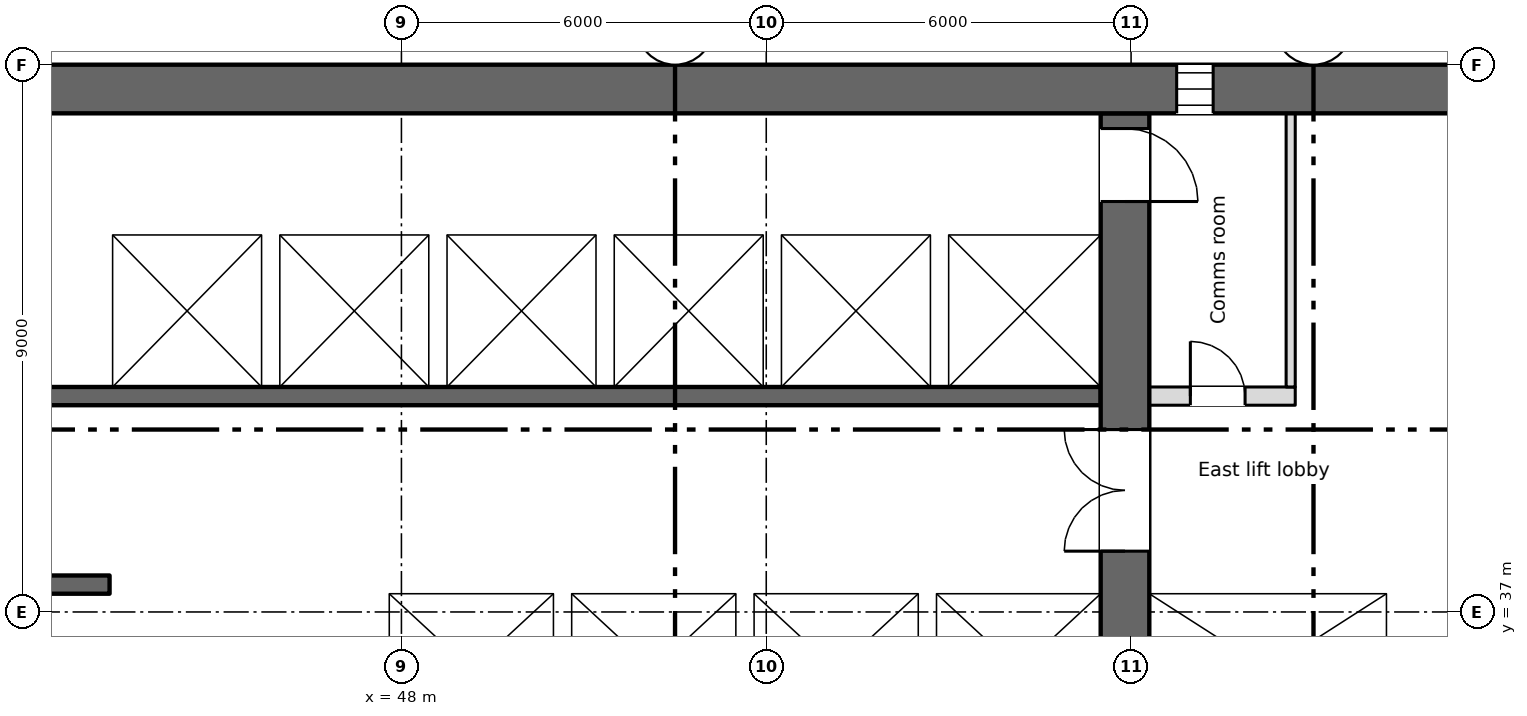
"""IFC4 building model, lengths in metres.
Left out: names, types, materials, properties, quantities, classifications, styles, units other than length and angle.
Written with IfcOpenShell. Run it as: python <this file> out.ifc"""

import sys

from ifc_helpers import new_model, si_unit, direction, frame, frame_2d, origin, place, context, subcontext, project, spatial, rectangle, extrude, element, fill, save


model = new_model("IFC4")
c1 = context("Model", 3, precision=1e-05, world=origin(), true_north=direction((0.0, 1.0)))
c2 = subcontext(c1, "Body", "Model", "MODEL_VIEW")
j1 = project(units=[si_unit("LENGTHUNIT", "METRE"), si_unit("PLANEANGLEUNIT", "RADIAN")], contexts=[c1])
p1 = place(None, origin())
s1 = spatial("IfcSite", under=j1, at=p1, CompositionType="ELEMENT")
p2 = place(p1, origin())
s2 = spatial("IfcBuilding", under=s1, at=p2, CompositionType="ELEMENT")
p3 = place(p2, frame((0.0, 0.0, 132.5)))
s3 = spatial("IfcBuildingStorey", under=s2, at=p3, CompositionType="ELEMENT", Elevation=132.5)
p4 = place(p3, frame((5.55, 45.6, 0.0), z_axis=(0.0, 0.0, 1.0), x_axis=(1.0, 0.0, 0.0)))
e1 = element("IfcWall", 1, at=p4, inside=s3, PredefinedType="SHEAR", context=c2, shape_type="SweptSolid", body=[
    extrude(rectangle(XDim=60.9, YDim=0.8, at=frame_2d((30.45, 0.0))), origin(), (0.0, 0.0, 1.0), 3.35),
])
p5 = place(p4, frame((1.2, 0.0, 0.6)))
e2 = element("IfcOpeningElement", 2, at=p5, cuts=e1, PredefinedType="OPENING", context=c2, shape_type="SweptSolid", body=[
    extrude(rectangle(XDim=0.6, YDim=2.4, at=frame_2d((0.3, 1.2))), frame((0.0, 0.41, 0.0), z_axis=(0.0, -1.0, 0.0), x_axis=(1.0, 0.0, 0.0)), (0.0, 0.0, 1.0), 0.82),
])
p6 = place(p4, frame((7.2, 0.0, 0.6)))
e3 = element("IfcOpeningElement", 3, at=p6, cuts=e1, PredefinedType="OPENING", context=c2, shape_type="SweptSolid", body=[
    extrude(rectangle(XDim=0.6, YDim=2.4, at=frame_2d((0.3, 1.2))), frame((0.0, 0.41, 0.0), z_axis=(0.0, -1.0, 0.0), x_axis=(1.0, 0.0, 0.0)), (0.0, 0.0, 1.0), 0.82),
])
p7 = place(p4, frame((55.2, 0.0, 0.6)))
e4 = element("IfcOpeningElement", 4, at=p7, cuts=e1, PredefinedType="OPENING", context=c2, shape_type="SweptSolid", body=[
    extrude(rectangle(XDim=0.6, YDim=2.4, at=frame_2d((0.3, 1.2))), frame((0.0, 0.41, 0.0), z_axis=(0.0, -1.0, 0.0), x_axis=(1.0, 0.0, 0.0)), (0.0, 0.0, 1.0), 0.82),
])
p8 = place(p3, frame((64.35, 34.8, 0.0), z_axis=(0.0, 0.0, 1.0), x_axis=(0.0, 1.0, 0.0)))
e5 = element("IfcWall", 5, at=p8, inside=s3, PredefinedType="SHEAR", context=c2, shape_type="SweptSolid", body=[
    extrude(rectangle(XDim=10.4, YDim=0.3, at=frame_2d((5.2, 0.0))), origin(), (0.0, 0.0, 1.0), 3.35),
])
p9 = place(p3, frame((59.9, 28.4, 0.0), z_axis=(0.0, 0.0, 1.0), x_axis=(0.0, 1.0, 0.0)))
e6 = element("IfcWall", 6, at=p9, inside=s3, PredefinedType="SHEAR", context=c2, shape_type="SweptSolid", body=[
    extrude(rectangle(XDim=16.8, YDim=0.8, at=frame_2d((8.4, 0.0))), origin(), (0.0, 0.0, 1.0), 3.35),
])
p10 = place(p9, frame((9.6, 0.0, 0.0)))
e7 = element("IfcOpeningElement", 7, at=p10, cuts=e6, PredefinedType="OPENING", context=c2, shape_type="SweptSolid", body=[
    extrude(rectangle(XDim=2.0, YDim=2.1, at=frame_2d((1.0, 1.05))), frame((0.0, 0.41, 0.0), z_axis=(0.0, -1.0, 0.0), x_axis=(1.0, 0.0, 0.0)), (0.0, 0.0, 1.0), 0.82),
])
p11 = place(p9, frame((15.35, 0.0, 0.0)))
e8 = element("IfcOpeningElement", 8, at=p11, cuts=e6, PredefinedType="OPENING", context=c2, shape_type="SweptSolid", body=[
    extrude(rectangle(XDim=1.2, YDim=2.1, at=frame_2d((0.6, 1.05))), frame((0.0, 0.41, 0.0), z_axis=(0.0, -1.0, 0.0), x_axis=(1.0, 0.0, 0.0)), (0.0, 0.0, 1.0), 0.82),
])
p12 = place(p3, frame((43.2, 37.45, 0.0), z_axis=(0.0, 0.0, 1.0), x_axis=(-1.0, 0.0, 0.0)))
e9 = element("IfcWall", 9, at=p12, inside=s3, PredefinedType="SHEAR", context=c2, shape_type="SweptSolid", body=[
    extrude(rectangle(XDim=8.4, YDim=0.3, at=frame_2d((4.2, 0.0))), origin(), (0.0, 0.0, 1.0), 3.35),
])
p13 = place(p12, frame((3.75, 0.0, 0.0)))
e10 = element("IfcOpeningElement", 10, at=p13, cuts=e9, PredefinedType="OPENING", context=c2, shape_type="SweptSolid", body=[
    extrude(rectangle(XDim=0.9, YDim=2.1, at=frame_2d((0.45, 1.05))), frame((0.0, 0.16, 0.0), z_axis=(0.0, -1.0, 0.0), x_axis=(1.0, 0.0, 0.0)), (0.0, 0.0, 1.0), 0.32),
])
p14 = place(p3, frame((47.3, 37.45, 0.0), z_axis=(0.0, 0.0, 1.0), x_axis=(1.0, 0.0, 0.0)))
e11 = element("IfcWall", 11, at=p14, inside=s3, PredefinedType="SHEAR", context=c2, shape_type="SweptSolid", body=[
    extrude(rectangle(XDim=12.2, YDim=0.3, at=frame_2d((6.1, 0.0))), origin(), (0.0, 0.0, 1.0), 3.35),
])
p15 = place(p14, frame((4.3, 0.0, 0.0)))
e12 = element("IfcOpeningElement", 12, at=p15, cuts=e11, PredefinedType="OPENING", context=c2, shape_type="SweptSolid", body=[
    extrude(rectangle(XDim=1.1, YDim=2.1, at=frame_2d((0.55, 1.05))), frame((0.0, 0.16, 0.0), z_axis=(0.0, -1.0, 0.0), x_axis=(1.0, 0.0, 0.0)), (0.0, 0.0, 1.0), 0.32),
])
p16 = place(p14, frame((7.3, 0.0, 0.0)))
e13 = element("IfcOpeningElement", 13, at=p16, cuts=e11, PredefinedType="OPENING", context=c2, shape_type="SweptSolid", body=[
    extrude(rectangle(XDim=1.1, YDim=2.1, at=frame_2d((0.55, 1.05))), frame((0.0, 0.16, 0.0), z_axis=(0.0, -1.0, 0.0), x_axis=(1.0, 0.0, 0.0)), (0.0, 0.0, 1.0), 0.32),
])
p17 = place(p14, frame((10.3, 0.0, 0.0)))
e14 = element("IfcOpeningElement", 14, at=p17, cuts=e11, PredefinedType="OPENING", context=c2, shape_type="SweptSolid", body=[
    extrude(rectangle(XDim=1.1, YDim=2.1, at=frame_2d((0.55, 1.05))), frame((0.0, 0.16, 0.0), z_axis=(0.0, -1.0, 0.0), x_axis=(1.0, 0.0, 0.0)), (0.0, 0.0, 1.0), 0.32),
])
p18 = place(p3, frame((60.3, 37.45, 0.0), z_axis=(0.0, 0.0, 1.0), x_axis=(1.0, 0.0, 0.0)))
e15 = element("IfcWall", 15, at=p18, inside=s3, PredefinedType="SHEAR", context=c2, shape_type="SweptSolid", body=[
    extrude(rectangle(XDim=3.9, YDim=0.3, at=frame_2d((1.95, 0.0))), origin(), (0.0, 0.0, 1.0), 3.35),
])
p19 = place(p18, frame((1.4, 0.0, 0.0)))
e16 = element("IfcOpeningElement", 16, at=p19, cuts=e15, PredefinedType="OPENING", context=c2, shape_type="SweptSolid", body=[
    extrude(rectangle(XDim=1.1, YDim=2.1, at=frame_2d((0.55, 1.05))), frame((0.0, 0.16, 0.0), z_axis=(0.0, -1.0, 0.0), x_axis=(1.0, 0.0, 0.0)), (0.0, 0.0, 1.0), 0.32),
])
p20 = place(p3, frame((43.05, 34.8, 0.0), z_axis=(0.0, 0.0, 1.0), x_axis=(0.0, 1.0, 0.0)))
e17 = element("IfcWall", 17, at=p20, inside=s3, PredefinedType="SHEAR", context=c2, shape_type="SweptSolid", body=[
    extrude(rectangle(XDim=2.5, YDim=0.3, at=frame_2d((1.25, 0.0))), origin(), (0.0, 0.0, 1.0), 3.35),
])
p21 = place(p3, frame((47.55, 34.8, 0.0), z_axis=(0.0, 0.0, 1.0), x_axis=(0.0, 1.0, 0.0)))
e18 = element("IfcWall", 18, at=p21, inside=s3, PredefinedType="SHEAR", context=c2, shape_type="SweptSolid", body=[
    extrude(rectangle(XDim=2.5, YDim=0.5, at=frame_2d((1.25, 0.0))), origin(), (0.0, 0.0, 1.0), 3.35),
])
p22 = place(p3, frame((50.65, 34.8, 0.0), z_axis=(0.0, 0.0, 1.0), x_axis=(0.0, 1.0, 0.0)))
e19 = element("IfcWall", 19, at=p22, inside=s3, PredefinedType="SHEAR", context=c2, shape_type="SweptSolid", body=[
    extrude(rectangle(XDim=2.5, YDim=0.3, at=frame_2d((1.25, 0.0))), origin(), (0.0, 0.0, 1.0), 3.35),
])
p23 = place(p3, frame((18.5, 40.55, 0.0), z_axis=(0.0, 0.0, 1.0), x_axis=(1.0, 0.0, 0.0)))
e20 = element("IfcWall", 20, at=p23, inside=s3, PredefinedType="SHEAR", context=c2, shape_type="SweptSolid", body=[
    extrude(rectangle(XDim=41.0, YDim=0.3, at=frame_2d((20.5, 0.0))), origin(), (0.0, 0.0, 1.0), 3.35),
])
p24 = place(p23, frame((15.9, 0.0, 0.0)))
e21 = element("IfcOpeningElement", 21, at=p24, cuts=e20, PredefinedType="OPENING", context=c2, shape_type="SweptSolid", body=[
    extrude(rectangle(XDim=0.9, YDim=2.1, at=frame_2d((0.45, 1.05))), frame((0.0, 0.16, 0.0), z_axis=(0.0, -1.0, 0.0), x_axis=(1.0, 0.0, 0.0)), (0.0, 0.0, 1.0), 0.32),
])
p25 = place(p23, frame((21.4, 0.0, 0.0)))
e22 = element("IfcOpeningElement", 22, at=p25, cuts=e20, PredefinedType="OPENING", context=c2, shape_type="SweptSolid", body=[
    extrude(rectangle(XDim=0.9, YDim=2.1, at=frame_2d((0.45, 1.05))), frame((0.0, 0.16, 0.0), z_axis=(0.0, -1.0, 0.0), x_axis=(1.0, 0.0, 0.0)), (0.0, 0.0, 1.0), 0.32),
])
p26 = place(p23, frame((6.175, 0.0, 0.0)))
e23 = element("IfcOpeningElement", 23, at=p26, cuts=e20, PredefinedType="OPENING", context=c2, shape_type="SweptSolid", body=[
    extrude(rectangle(XDim=1.1, YDim=2.1, at=frame_2d((0.55, 1.05))), frame((0.0, 0.16, 0.0), z_axis=(0.0, -1.0, 0.0), x_axis=(1.0, 0.0, 0.0)), (0.0, 0.0, 1.0), 0.32),
])
p27 = place(p23, frame((8.925, 0.0, 0.0)))
e24 = element("IfcOpeningElement", 24, at=p27, cuts=e20, PredefinedType="OPENING", context=c2, shape_type="SweptSolid", body=[
    extrude(rectangle(XDim=1.1, YDim=2.1, at=frame_2d((0.55, 1.05))), frame((0.0, 0.16, 0.0), z_axis=(0.0, -1.0, 0.0), x_axis=(1.0, 0.0, 0.0)), (0.0, 0.0, 1.0), 0.32),
])
p28 = place(p23, frame((11.675, 0.0, 0.0)))
e25 = element("IfcOpeningElement", 25, at=p28, cuts=e20, PredefinedType="OPENING", context=c2, shape_type="SweptSolid", body=[
    extrude(rectangle(XDim=1.1, YDim=2.1, at=frame_2d((0.55, 1.05))), frame((0.0, 0.16, 0.0), z_axis=(0.0, -1.0, 0.0), x_axis=(1.0, 0.0, 0.0)), (0.0, 0.0, 1.0), 0.32),
])
p29 = place(p23, frame((30.925, 0.0, 0.0)))
e26 = element("IfcOpeningElement", 26, at=p29, cuts=e20, PredefinedType="OPENING", context=c2, shape_type="SweptSolid", body=[
    extrude(rectangle(XDim=1.1, YDim=2.1, at=frame_2d((0.55, 1.05))), frame((0.0, 0.16, 0.0), z_axis=(0.0, -1.0, 0.0), x_axis=(1.0, 0.0, 0.0)), (0.0, 0.0, 1.0), 0.32),
])
p30 = place(p23, frame((33.675, 0.0, 0.0)))
e27 = element("IfcOpeningElement", 27, at=p30, cuts=e20, PredefinedType="OPENING", context=c2, shape_type="SweptSolid", body=[
    extrude(rectangle(XDim=1.1, YDim=2.1, at=frame_2d((0.55, 1.05))), frame((0.0, 0.16, 0.0), z_axis=(0.0, -1.0, 0.0), x_axis=(1.0, 0.0, 0.0)), (0.0, 0.0, 1.0), 0.32),
])
p31 = place(p23, frame((36.375, 0.0, 0.0)))
e28 = element("IfcOpeningElement", 28, at=p31, cuts=e20, PredefinedType="OPENING", context=c2, shape_type="SweptSolid", body=[
    extrude(rectangle(XDim=1.2, YDim=2.1, at=frame_2d((0.6, 1.05))), frame((0.0, 0.16, 0.0), z_axis=(0.0, -1.0, 0.0), x_axis=(1.0, 0.0, 0.0)), (0.0, 0.0, 1.0), 0.32),
])
p32 = place(p23, frame((39.15, 0.0, 0.0)))
e29 = element("IfcOpeningElement", 29, at=p32, cuts=e20, PredefinedType="OPENING", context=c2, shape_type="SweptSolid", body=[
    extrude(rectangle(XDim=1.2, YDim=2.1, at=frame_2d((0.6, 1.05))), frame((0.0, 0.16, 0.0), z_axis=(0.0, -1.0, 0.0), x_axis=(1.0, 0.0, 0.0)), (0.0, 0.0, 1.0), 0.32),
])
p33 = place(p3, frame((18.5, 43.35, 0.0), z_axis=(0.0, 0.0, 1.0), x_axis=(1.0, 0.0, 0.0)))
e30 = element("IfcWall", 30, at=p33, inside=s3, PredefinedType="SHEAR", context=c2, shape_type="SweptSolid", body=[
    extrude(rectangle(XDim=41.0, YDim=0.3, at=frame_2d((20.5, 0.0))), origin(), (0.0, 0.0, 1.0), 3.35),
])
p34 = place(p3, frame((60.3, 40.55, 0.0), z_axis=(0.0, 0.0, 1.0), x_axis=(1.0, 0.0, 0.0)))
e31 = element("IfcWall", 31, at=p34, inside=s3, PredefinedType="PARTITIONING", context=c2, shape_type="SweptSolid", body=[
    extrude(rectangle(XDim=2.4, YDim=0.3, at=frame_2d((1.2, 0.0))), origin(), (0.0, 0.0, 1.0), 3.35),
])
p35 = place(p34, frame((0.675, 0.0, 0.0)))
e32 = element("IfcOpeningElement", 32, at=p35, cuts=e31, PredefinedType="OPENING", context=c2, shape_type="SweptSolid", body=[
    extrude(rectangle(XDim=0.9, YDim=2.1, at=frame_2d((0.45, 1.05))), frame((0.0, 0.16, 0.0), z_axis=(0.0, -1.0, 0.0), x_axis=(1.0, 0.0, 0.0)), (0.0, 0.0, 1.0), 0.32),
])
for number, where, z_axis, x_axis in (
    (33, (53.65, 34.8, 0.0), (0.0, 0.0, 1.0), (0.0, 1.0, 0.0)),
    (34, (56.65, 34.8, 0.0), (0.0, 0.0, 1.0), (0.0, 1.0, 0.0)),
    (35, (43.1, 40.7, 0.0), (0.0, 0.0, 1.0), (0.0, 1.0, 0.0)),
    (36, (45.85, 40.7, 0.0), (0.0, 0.0, 1.0), (0.0, 1.0, 0.0)),
    (37, (48.6, 40.7, 0.0), (0.0, 0.0, 1.0), (0.0, 1.0, 0.0)),
    (38, (51.35, 40.7, 0.0), (0.0, 0.0, 1.0), (0.0, 1.0, 0.0)),
    (39, (54.1, 40.7, 0.0), (0.0, 0.0, 1.0), (0.0, 1.0, 0.0)),
    (40, (56.85, 40.7, 0.0), (0.0, 0.0, 1.0), (0.0, 1.0, 0.0)),
):
    element("IfcWall", number, at=place(p3, frame(where, z_axis=z_axis, x_axis=x_axis)), inside=s3, PredefinedType="SHEAR", context=c2, shape_type="SweptSolid", body=[
        extrude(rectangle(XDim=2.5, YDim=0.3, at=frame_2d((1.25, 0.0))), origin(), (0.0, 0.0, 1.0), 3.35),
    ])
p36 = place(p3, frame((62.625, 40.7, 0.0), z_axis=(0.0, 0.0, 1.0), x_axis=(0.0, 1.0, 0.0)))
e41 = element("IfcWall", 41, at=p36, inside=s3, PredefinedType="PARTITIONING", context=c2, shape_type="SweptSolid", body=[
    extrude(rectangle(XDim=4.5, YDim=0.15, at=frame_2d((2.25, 0.0))), origin(), (0.0, 0.0, 1.0), 3.35),
])
p37 = place(p7, origin())
e42 = element("IfcWindow", 42, at=p37, inside=s3, PartitioningType="SINGLE_PANEL", PredefinedType="WINDOW", context=c2, shape_type="SweptSolid", body=[
    extrude(rectangle(XDim=0.6, YDim=2.4, at=frame_2d((0.3, 1.2))), frame((0.0, 0.03, 0.0), z_axis=(0.0, -1.0, 0.0), x_axis=(1.0, 0.0, 0.0)), (0.0, 0.0, 1.0), 0.06),
])
fill(e4, e42)
p38 = place(p35, origin())
e43 = element("IfcDoor", 43, at=p38, inside=s3, OperationType="SINGLE_SWING_LEFT", PredefinedType="DOOR", context=c2, shape_type="SweptSolid", body=[
    extrude(rectangle(XDim=0.9, YDim=2.1, at=frame_2d((0.45, 1.05))), frame((0.0, 0.025, 0.0), z_axis=(0.0, -1.0, 0.0), x_axis=(1.0, 0.0, 0.0)), (0.0, 0.0, 1.0), 0.05),
])
fill(e32, e43)
p39 = place(p15, origin())
e44 = element("IfcDoor", 44, at=p39, inside=s3, OperationType="SLIDING_TO_LEFT", PredefinedType="DOOR", context=c2, shape_type="SweptSolid", body=[
    extrude(rectangle(XDim=1.1, YDim=2.1, at=frame_2d((0.55, 1.05))), frame((0.0, 0.025, 0.0), z_axis=(0.0, -1.0, 0.0), x_axis=(1.0, 0.0, 0.0)), (0.0, 0.0, 1.0), 0.05),
])
fill(e12, e44)
p40 = place(p16, origin())
e45 = element("IfcDoor", 45, at=p40, inside=s3, OperationType="SLIDING_TO_LEFT", PredefinedType="DOOR", context=c2, shape_type="SweptSolid", body=[
    extrude(rectangle(XDim=1.1, YDim=2.1, at=frame_2d((0.55, 1.05))), frame((0.0, 0.025, 0.0), z_axis=(0.0, -1.0, 0.0), x_axis=(1.0, 0.0, 0.0)), (0.0, 0.0, 1.0), 0.05),
])
fill(e13, e45)
p41 = place(p17, origin())
e46 = element("IfcDoor", 46, at=p41, inside=s3, OperationType="SLIDING_TO_LEFT", PredefinedType="DOOR", context=c2, shape_type="SweptSolid", body=[
    extrude(rectangle(XDim=1.1, YDim=2.1, at=frame_2d((0.55, 1.05))), frame((0.0, 0.025, 0.0), z_axis=(0.0, -1.0, 0.0), x_axis=(1.0, 0.0, 0.0)), (0.0, 0.0, 1.0), 0.05),
])
fill(e14, e46)
p42 = place(p29, origin())
e47 = element("IfcDoor", 47, at=p42, inside=s3, OperationType="SLIDING_TO_LEFT", PredefinedType="DOOR", context=c2, shape_type="SweptSolid", body=[
    extrude(rectangle(XDim=1.1, YDim=2.1, at=frame_2d((0.55, 1.05))), frame((0.0, 0.025, 0.0), z_axis=(0.0, -1.0, 0.0), x_axis=(1.0, 0.0, 0.0)), (0.0, 0.0, 1.0), 0.05),
])
fill(e26, e47)
p43 = place(p30, origin())
e48 = element("IfcDoor", 48, at=p43, inside=s3, OperationType="SLIDING_TO_LEFT", PredefinedType="DOOR", context=c2, shape_type="SweptSolid", body=[
    extrude(rectangle(XDim=1.1, YDim=2.1, at=frame_2d((0.55, 1.05))), frame((0.0, 0.025, 0.0), z_axis=(0.0, -1.0, 0.0), x_axis=(1.0, 0.0, 0.0)), (0.0, 0.0, 1.0), 0.05),
])
fill(e27, e48)
p44 = place(p31, origin())
e49 = element("IfcDoor", 49, at=p44, inside=s3, OperationType="SLIDING_TO_LEFT", PredefinedType="DOOR", context=c2, shape_type="SweptSolid", body=[
    extrude(rectangle(XDim=1.2, YDim=2.1, at=frame_2d((0.6, 1.05))), frame((0.0, 0.025, 0.0), z_axis=(0.0, -1.0, 0.0), x_axis=(1.0, 0.0, 0.0)), (0.0, 0.0, 1.0), 0.05),
])
fill(e28, e49)
p45 = place(p32, origin())
e50 = element("IfcDoor", 50, at=p45, inside=s3, OperationType="SLIDING_TO_LEFT", PredefinedType="DOOR", context=c2, shape_type="SweptSolid", body=[
    extrude(rectangle(XDim=1.2, YDim=2.1, at=frame_2d((0.6, 1.05))), frame((0.0, 0.025, 0.0), z_axis=(0.0, -1.0, 0.0), x_axis=(1.0, 0.0, 0.0)), (0.0, 0.0, 1.0), 0.05),
])
fill(e29, e50)
p46 = place(p19, origin())
e51 = element("IfcDoor", 51, at=p46, inside=s3, OperationType="SLIDING_TO_LEFT", PredefinedType="DOOR", context=c2, shape_type="SweptSolid", body=[
    extrude(rectangle(XDim=1.1, YDim=2.1, at=frame_2d((0.55, 1.05))), frame((0.0, 0.025, 0.0), z_axis=(0.0, -1.0, 0.0), x_axis=(1.0, 0.0, 0.0)), (0.0, 0.0, 1.0), 0.05),
])
fill(e16, e51)
p47 = place(p10, origin())
e52 = element("IfcDoor", 52, at=p47, inside=s3, OperationType="DOUBLE_DOOR_SINGLE_SWING", PredefinedType="DOOR", context=c2, shape_type="SweptSolid", body=[
    extrude(rectangle(XDim=2.0, YDim=2.1, at=frame_2d((1.0, 1.05))), frame((0.0, 0.025, 0.0), z_axis=(0.0, -1.0, 0.0), x_axis=(1.0, 0.0, 0.0)), (0.0, 0.0, 1.0), 0.05),
])
fill(e7, e52)
p48 = place(p11, origin())
e53 = element("IfcDoor", 53, at=p48, inside=s3, OperationType="SINGLE_SWING_LEFT", PredefinedType="DOOR", context=c2, shape_type="SweptSolid", body=[
    extrude(rectangle(XDim=1.2, YDim=2.1, at=frame_2d((0.6, 1.05))), frame((0.0, 0.025, 0.0), z_axis=(0.0, -1.0, 0.0), x_axis=(1.0, 0.0, 0.0)), (0.0, 0.0, 1.0), 0.05),
])
fill(e8, e53)
save(model, sys.argv[1])
